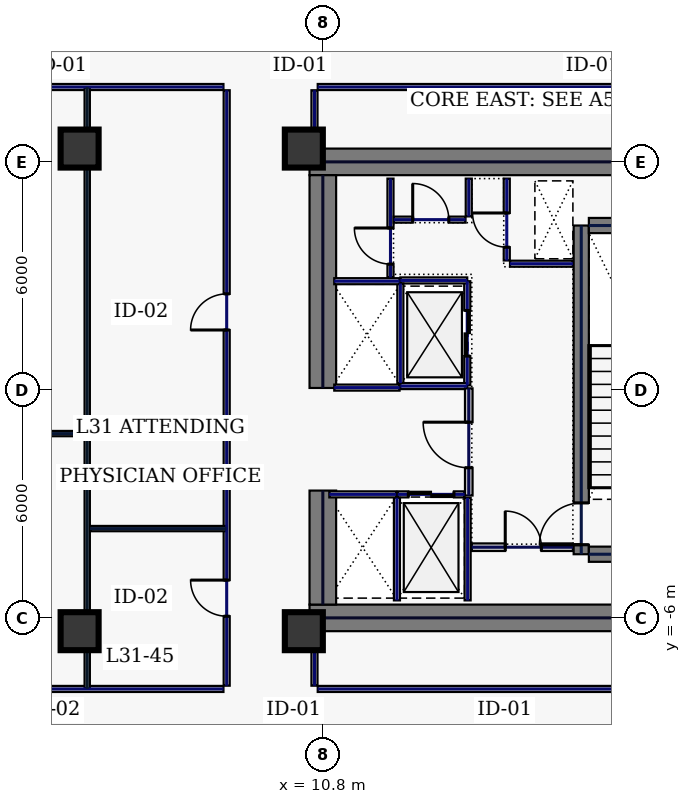
"""IFC4 building model, lengths in metres.
Left out: names, types, materials, properties, quantities, classifications, styles, units other than length and angle.
Written with IfcOpenShell. Run it as: python <this file> out.ifc"""

import sys

from ifc_helpers import new_model, si_unit, direction, frame, frame_2d, origin, origin_2d, place, context, subcontext, project, spatial, rectangle, hollow_rectangle, extrude, element, fill, save


model = new_model("IFC4")
c1 = context("Model", 3, precision=1e-05, world=origin(), true_north=direction((0.0, 1.0)))
c2 = subcontext(c1, "Body", "Model", "MODEL_VIEW")
j1 = project(units=[si_unit("LENGTHUNIT", "METRE"), si_unit("PLANEANGLEUNIT", "RADIAN")], contexts=[c1])
p1 = place(None, origin())
s1 = spatial("IfcSite", under=j1, at=p1, CompositionType="ELEMENT")
p2 = place(p1, origin())
s2 = spatial("IfcBuilding", under=s1, at=p2, CompositionType="ELEMENT")
p3 = place(p2, frame((0.0, 0.0, 137.4)))
s3 = spatial("IfcBuildingStorey", under=s2, at=p3, CompositionType="ELEMENT", Elevation=137.4)
for number, where, z_axis, x_axis in (
    (1, (10.45, 6.0, 0.0), (0.0, 0.0, 1.0), (1.0, 0.0, 0.0)),
    (2, (10.45, -6.0, 0.0), (0.0, 0.0, 1.0), (1.0, 0.0, 0.0)),
):
    element("IfcWall", number, at=place(p3, frame(where, z_axis=z_axis, x_axis=x_axis)), inside=s3, PredefinedType="SHEAR", context=c2, shape_type="SweptSolid", body=[
        extrude(rectangle(XDim=11.55, YDim=0.7, at=frame_2d((5.775, 0.0))), origin(), (0.0, 0.0, 1.0), 3.74),
    ])
p4 = place(p3, frame((10.8, -5.65, 0.0), z_axis=(0.0, 0.0, 1.0), x_axis=(0.0, 1.0, 0.0)))
e3 = element("IfcWall", 3, at=p4, inside=s3, PredefinedType="SHEAR", context=c2, shape_type="SweptSolid", body=[
    extrude(rectangle(XDim=3.0, YDim=0.7, at=frame_2d((1.5, 0.0))), origin(), (0.0, 0.0, 1.0), 3.74),
])
p5 = place(p3, frame((10.8, 0.05, 0.0), z_axis=(0.0, 0.0, 1.0), x_axis=(0.0, 1.0, 0.0)))
e4 = element("IfcWall", 4, at=p5, inside=s3, PredefinedType="SHEAR", context=c2, shape_type="SweptSolid", body=[
    extrude(rectangle(XDim=5.6, YDim=0.7, at=frame_2d((2.8, 0.0))), origin(), (0.0, 0.0, 1.0), 3.74),
])
p6 = place(p3, frame((17.6, -4.325, 0.0), z_axis=(0.0, 0.0, 1.0), x_axis=(0.0, 1.0, 0.0)))
e5 = element("IfcWall", 5, at=p6, inside=s3, PredefinedType="SHEAR", context=c2, shape_type="SweptSolid", body=[
    extrude(rectangle(XDim=8.65, YDim=0.4, at=frame_2d((4.325, 0.0))), origin(), (0.0, 0.0, 1.0), 3.74),
])
p7 = place(p6, frame((0.25, 0.0, 0.0)))
e6 = element("IfcOpeningElement", 6, at=p7, cuts=e5, PredefinedType="OPENING", context=c2, shape_type="SweptSolid", body=[
    extrude(rectangle(XDim=1.1, YDim=2.2, at=frame_2d((0.55, 1.1))), frame((0.0, 0.21, 0.0), z_axis=(0.0, -1.0, 0.0), x_axis=(1.0, 0.0, 0.0)), (0.0, 0.0, 1.0), 0.42),
])
for number, where, z_axis, x_axis in (
    (7, (17.8, -4.325, 0.0), (0.0, 0.0, 1.0), (1.0, 0.0, 0.0)),
    (8, (17.8, 4.325, 0.0), (0.0, 0.0, 1.0), (1.0, 0.0, 0.0)),
):
    element("IfcWall", number, at=place(p3, frame(where, z_axis=z_axis, x_axis=x_axis)), inside=s3, PredefinedType="SHEAR", context=c2, shape_type="SweptSolid", body=[
        extrude(rectangle(XDim=3.4, YDim=0.4, at=frame_2d((1.7, 0.0))), origin(), (0.0, 0.0, 1.0), 3.74),
    ])
for number, where, z_axis, x_axis in (
    (9, (10.3, -6.35, 0.0), (0.0, 0.0, 1.0), (1.0, 0.0, 0.0)),
    (10, (10.3, 6.35, 0.0), (0.0, 0.0, 1.0), (1.0, 0.0, 0.0)),
    (11, (4.4, -6.35, 0.0), (0.0, 0.0, 1.0), (1.0, 0.0, 0.0)),
    (12, (4.4, 6.35, 0.0), (0.0, 0.0, 1.0), (1.0, 0.0, 0.0)),
):
    element("IfcColumn", number, at=place(p3, frame(where, z_axis=z_axis, x_axis=x_axis)), inside=s3, PredefinedType="COLUMN", context=c2, shape_type="SweptSolid", body=[
        extrude(hollow_rectangle(XDim=1.0, YDim=1.0, WallThickness=0.045, at=origin_2d()), origin(), (0.0, 0.0, 1.0), 3.74),
    ])
p8 = place(p3, frame((14.6, 0.12, 0.0), z_axis=(0.0, 0.0, 1.0), x_axis=(0.0, 1.0, 0.0)))
e13 = element("IfcWall", 13, at=p8, inside=s3, PredefinedType="PARTITIONING", context=c2, shape_type="SweptSolid", body=[
    extrude(rectangle(XDim=2.74, YDim=0.16, at=frame_2d((1.37, 0.0))), origin(), (0.0, 0.0, 1.0), 3.74),
])
p9 = place(p8, frame((0.77, 0.0, 0.0)))
e14 = element("IfcOpeningElement", 14, at=p9, cuts=e13, PredefinedType="OPENING", context=c2, shape_type="SweptSolid", body=[
    extrude(rectangle(XDim=1.2, YDim=2.2, at=frame_2d((0.6, 1.1))), frame((0.0, 0.09, 0.0), z_axis=(0.0, -1.0, 0.0), x_axis=(1.0, 0.0, 0.0)), (0.0, 0.0, 1.0), 0.18),
])
for number, where, z_axis, x_axis in (
    (15, (12.84, 0.1, 0.0), (0.0, 0.0, 1.0), (1.0, 0.0, 0.0)),
    (16, (12.84, 2.88, 0.0), (0.0, 0.0, 1.0), (1.0, 0.0, 0.0)),
):
    element("IfcWall", number, at=place(p3, frame(where, z_axis=z_axis, x_axis=x_axis)), inside=s3, PredefinedType="PARTITIONING", context=c2, shape_type="SweptSolid", body=[
        extrude(rectangle(XDim=1.76, YDim=0.16, at=frame_2d((0.88, 0.0))), origin(), (0.0, 0.0, 1.0), 3.74),
    ])
p10 = place(p3, frame((12.84, 0.18, 0.0), z_axis=(0.0, 0.0, 1.0), x_axis=(0.0, 1.0, 0.0)))
e17 = element("IfcWall", 17, at=p10, inside=s3, PredefinedType="PARTITIONING", context=c2, shape_type="SweptSolid", body=[
    extrude(rectangle(XDim=2.62, YDim=0.16, at=frame_2d((1.31, 0.0))), origin(), (0.0, 0.0, 1.0), 3.74),
])
p11 = place(p3, frame((12.77, -2.75, 0.0), z_axis=(0.0, 0.0, 1.0), x_axis=(1.0, 0.0, 0.0)))
e18 = element("IfcWall", 18, at=p11, inside=s3, PredefinedType="PARTITIONING", context=c2, shape_type="SweptSolid", body=[
    extrude(rectangle(XDim=1.76, YDim=0.16, at=frame_2d((0.88, 0.0))), origin(), (0.0, 0.0, 1.0), 3.74),
])
p12 = place(p11, frame((0.28, 0.0, 0.0)))
e19 = element("IfcOpeningElement", 19, at=p12, cuts=e18, PredefinedType="OPENING", context=c2, shape_type="SweptSolid", body=[
    extrude(rectangle(XDim=1.2, YDim=2.2, at=frame_2d((0.6, 1.1))), frame((0.0, 0.09, 0.0), z_axis=(0.0, -1.0, 0.0), x_axis=(1.0, 0.0, 0.0)), (0.0, 0.0, 1.0), 0.18),
])
for number, where, z_axis, x_axis in (
    (20, (12.75, -5.54, 0.0), (0.0, 0.0, 1.0), (0.0, 1.0, 0.0)),
    (21, (14.61, -5.54, 0.0), (0.0, 0.0, 1.0), (0.0, 1.0, 0.0)),
):
    element("IfcWall", number, at=place(p3, frame(where, z_axis=z_axis, x_axis=x_axis)), inside=s3, PredefinedType="PARTITIONING", context=c2, shape_type="SweptSolid", body=[
        extrude(rectangle(XDim=2.7, YDim=0.16, at=frame_2d((1.35, 0.0))), origin(), (0.0, 0.0, 1.0), 3.74),
    ])
p13 = place(p3, frame((10.97, -2.75, 0.0), z_axis=(0.0, 0.0, 1.0), x_axis=(1.0, 0.0, 0.0)))
e22 = element("IfcWall", 22, at=p13, inside=s3, PredefinedType="PARTITIONING", context=c2, shape_type="SweptSolid", body=[
    extrude(rectangle(XDim=1.76, YDim=0.16, at=frame_2d((0.88, 0.0))), origin(), (0.0, 0.0, 1.0), 3.74),
])
for number, where, z_axis, x_axis in (
    (23, (11.1, 0.06, 0.0), (0.0, 0.0, 1.0), (1.0, 0.0, 0.0)),
    (24, (11.1, 2.86, 0.0), (0.0, 0.0, 1.0), (1.0, 0.0, 0.0)),
):
    element("IfcWall", number, at=place(p3, frame(where, z_axis=z_axis, x_axis=x_axis)), inside=s3, PredefinedType="PARTITIONING", context=c2, shape_type="SweptSolid", body=[
        extrude(rectangle(XDim=1.72, YDim=0.16, at=frame_2d((0.86, 0.0))), origin(), (0.0, 0.0, 1.0), 3.74),
    ])
p14 = place(p3, frame((15.64, 3.405, 0.0), z_axis=(0.0, 0.0, 1.0), x_axis=(0.0, 1.0, 0.0)))
e25 = element("IfcWall", 25, at=p14, inside=s3, PredefinedType="PARTITIONING", context=c2, shape_type="SweptSolid", body=[
    extrude(rectangle(XDim=2.155, YDim=0.16, at=frame_2d((1.078, 0.0))), origin(), (0.0, 0.0, 1.0), 3.74),
])
p15 = place(p14, frame((0.35, 0.0, 0.0)))
e26 = element("IfcOpeningElement", 26, at=p15, cuts=e25, PredefinedType="OPENING", context=c2, shape_type="SweptSolid", body=[
    extrude(rectangle(XDim=0.9, YDim=2.2, at=frame_2d((0.45, 1.1))), frame((0.0, 0.09, 0.0), z_axis=(0.0, -1.0, 0.0), x_axis=(1.0, 0.0, 0.0)), (0.0, 0.0, 1.0), 0.18),
])
p16 = place(p3, frame((15.725, 3.32, 0.0), z_axis=(0.0, 0.0, 1.0), x_axis=(1.0, 0.0, 0.0)))
e27 = element("IfcWall", 27, at=p16, inside=s3, PredefinedType="PARTITIONING", context=c2, shape_type="SweptSolid", body=[
    extrude(rectangle(XDim=1.655, YDim=0.16, at=frame_2d((0.827, 0.0))), origin(), (0.0, 0.0, 1.0), 3.74),
])
p17 = place(p3, frame((14.72, -4.14, 0.0), z_axis=(0.0, 0.0, 1.0), x_axis=(1.0, 0.0, 0.0)))
e28 = element("IfcWall", 28, at=p17, inside=s3, PredefinedType="SOLIDWALL", context=c2, shape_type="SweptSolid", body=[
    extrude(rectangle(XDim=2.66, YDim=0.2, at=frame_2d((1.33, 0.0))), origin(), (0.0, 0.0, 1.0), 3.74),
])
p18 = place(p17, frame((0.88, 0.0, 0.0)))
e29 = element("IfcOpeningElement", 29, at=p18, cuts=e28, PredefinedType="OPENING", context=c2, shape_type="SweptSolid", body=[
    extrude(rectangle(XDim=0.95, YDim=2.2, at=frame_2d((0.475, 1.1))), frame((0.0, 0.11, 0.0), z_axis=(0.0, -1.0, 0.0), x_axis=(1.0, 0.0, 0.0)), (0.0, 0.0, 1.0), 0.22),
])
p19 = place(p3, frame((12.58, 2.96, 0.0), z_axis=(0.0, 0.0, 1.0), x_axis=(0.0, 1.0, 0.0)))
e30 = element("IfcWall", 30, at=p19, inside=s3, PredefinedType="PARTITIONING", context=c2, shape_type="SweptSolid", body=[
    extrude(rectangle(XDim=2.6, YDim=0.16, at=frame_2d((1.3, 0.0))), origin(), (0.0, 0.0, 1.0), 3.74),
])
p20 = place(p19, frame((0.35, 0.0, 0.0)))
e31 = element("IfcOpeningElement", 31, at=p20, cuts=e30, PredefinedType="OPENING", context=c2, shape_type="SweptSolid", body=[
    extrude(rectangle(XDim=0.95, YDim=2.2, at=frame_2d((0.475, 1.1))), frame((0.0, 0.09, 0.0), z_axis=(0.0, -1.0, 0.0), x_axis=(1.0, 0.0, 0.0)), (0.0, 0.0, 1.0), 0.18),
])
p21 = place(p3, frame((12.665, 4.48, 0.0), z_axis=(0.0, 0.0, 1.0), x_axis=(1.0, 0.0, 0.0)))
e32 = element("IfcWall", 32, at=p21, inside=s3, PredefinedType="PARTITIONING", context=c2, shape_type="SweptSolid", body=[
    extrude(rectangle(XDim=1.89, YDim=0.16, at=frame_2d((0.945, 0.0))), origin(), (0.0, 0.0, 1.0), 3.74),
])
p22 = place(p21, frame((0.5, 0.0, 0.0)))
e33 = element("IfcOpeningElement", 33, at=p22, cuts=e32, PredefinedType="OPENING", context=c2, shape_type="SweptSolid", body=[
    extrude(rectangle(XDim=0.95, YDim=2.2, at=frame_2d((0.475, 1.1))), frame((0.0, 0.09, 0.0), z_axis=(0.0, -1.0, 0.0), x_axis=(1.0, 0.0, 0.0)), (0.0, 0.0, 1.0), 0.18),
])
p23 = place(p3, frame((14.64, 4.565, 0.0), z_axis=(0.0, 0.0, 1.0), x_axis=(0.0, 1.0, 0.0)))
e34 = element("IfcWall", 34, at=p23, inside=s3, PredefinedType="PARTITIONING", context=c2, shape_type="SweptSolid", body=[
    extrude(rectangle(XDim=0.995, YDim=0.16, at=frame_2d((0.498, 0.0))), origin(), (0.0, 0.0, 1.0), 3.74),
])
p24 = place(p3, frame((14.64, -2.78, 0.0), z_axis=(0.0, 0.0, 1.0), x_axis=(0.0, 1.0, 0.0)))
e35 = element("IfcWall", 35, at=p24, inside=s3, PredefinedType="SOLIDWALL", context=c2, shape_type="SweptSolid", body=[
    extrude(rectangle(XDim=2.82, YDim=0.2, at=frame_2d((1.41, 0.0))), origin(), (0.0, 0.0, 1.0), 3.74),
])
p25 = place(p24, frame((0.73, 0.0, 0.0)))
e36 = element("IfcOpeningElement", 36, at=p25, cuts=e35, PredefinedType="OPENING", context=c2, shape_type="SweptSolid", body=[
    extrude(rectangle(XDim=1.2, YDim=2.2, at=frame_2d((0.6, 1.1))), frame((0.0, 0.11, 0.0), z_axis=(0.0, -1.0, 0.0), x_axis=(1.0, 0.0, 0.0)), (0.0, 0.0, 1.0), 0.22),
])
p26 = place(p3, frame((25.235, 7.97, 0.0), z_axis=(0.0, 0.0, 1.0), x_axis=(-1.0, 0.0, 0.0)))
e37 = element("IfcWall", 37, at=p26, inside=s3, PredefinedType="PARTITIONING", context=c2, shape_type="SweptSolid", body=[
    extrude(rectangle(XDim=14.57, YDim=0.16, at=frame_2d((7.285, 0.0))), origin(), (0.0, 0.0, 1.0), 3.74),
])
p27 = place(p3, frame((10.58, 7.885, 0.0), z_axis=(0.0, 0.0, 1.0), x_axis=(0.0, -1.0, 0.0)))
e38 = element("IfcWall", 38, at=p27, inside=s3, PredefinedType="PARTITIONING", context=c2, shape_type="SweptSolid", body=[
    extrude(rectangle(XDim=1.465, YDim=0.16, at=frame_2d((0.732, 0.0))), origin(), (0.0, 0.0, 1.0), 3.74),
])
p28 = place(p3, frame((10.58, -6.42, 0.0), z_axis=(0.0, 0.0, 1.0), x_axis=(0.0, -1.0, 0.0)))
e39 = element("IfcWall", 39, at=p28, inside=s3, PredefinedType="PARTITIONING", context=c2, shape_type="SweptSolid", body=[
    extrude(rectangle(XDim=1.365, YDim=0.16, at=frame_2d((0.683, 0.0))), origin(), (0.0, 0.0, 1.0), 3.74),
])
p29 = place(p3, frame((10.665, -7.87, 0.0), z_axis=(0.0, 0.0, 1.0), x_axis=(1.0, 0.0, 0.0)))
e40 = element("IfcWall", 40, at=p29, inside=s3, PredefinedType="PARTITIONING", context=c2, shape_type="SweptSolid", body=[
    extrude(rectangle(XDim=14.57, YDim=0.16, at=frame_2d((7.285, 0.0))), origin(), (0.0, 0.0, 1.0), 3.74),
])
p30 = place(p3, frame((8.27, -7.785, 0.0), z_axis=(0.0, 0.0, 1.0), x_axis=(0.0, 1.0, 0.0)))
e41 = element("IfcWall", 41, at=p30, inside=s3, PredefinedType="PARTITIONING", context=c2, shape_type="SweptSolid", body=[
    extrude(rectangle(XDim=15.67, YDim=0.16, at=frame_2d((7.835, 0.0))), origin(), (0.0, 0.0, 1.0), 3.74),
])
p31 = place(p30, frame((1.829, 0.0, 0.0)))
e42 = element("IfcOpeningElement", 42, at=p31, cuts=e41, PredefinedType="OPENING", context=c2, shape_type="SweptSolid", body=[
    extrude(rectangle(XDim=0.95, YDim=2.2, at=frame_2d((0.475, 1.1))), frame((0.0, 0.09, 0.0), z_axis=(0.0, -1.0, 0.0), x_axis=(1.0, 0.0, 0.0)), (0.0, 0.0, 1.0), 0.18),
])
p32 = place(p30, frame((9.361, 0.0, 0.0)))
e43 = element("IfcOpeningElement", 43, at=p32, cuts=e41, PredefinedType="OPENING", context=c2, shape_type="SweptSolid", body=[
    extrude(rectangle(XDim=0.95, YDim=2.2, at=frame_2d((0.475, 1.1))), frame((0.0, 0.09, 0.0), z_axis=(0.0, -1.0, 0.0), x_axis=(1.0, 0.0, 0.0)), (0.0, 0.0, 1.0), 0.18),
])
p33 = place(p3, frame((8.185, 7.97, 0.0), z_axis=(0.0, 0.0, 1.0), x_axis=(-1.0, 0.0, 0.0)))
e44 = element("IfcWall", 44, at=p33, inside=s3, PredefinedType="PARTITIONING", context=c2, shape_type="SweptSolid", body=[
    extrude(rectangle(XDim=16.37, YDim=0.16, at=frame_2d((8.185, 0.0))), origin(), (0.0, 0.0, 1.0), 3.74),
])
p34 = place(p33, frame((7.795, 0.0, 0.0)))
e45 = element("IfcOpeningElement", 45, at=p34, cuts=e44, PredefinedType="OPENING", context=c2, shape_type="SweptSolid", body=[
    extrude(rectangle(XDim=0.95, YDim=2.2, at=frame_2d((0.475, 1.1))), frame((0.0, 0.09, 0.0), z_axis=(0.0, -1.0, 0.0), x_axis=(1.0, 0.0, 0.0)), (0.0, 0.0, 1.0), 0.18),
])
p35 = place(p3, frame((-8.185, -7.87, 0.0), z_axis=(0.0, 0.0, 1.0), x_axis=(1.0, 0.0, 0.0)))
e46 = element("IfcWall", 46, at=p35, inside=s3, PredefinedType="PARTITIONING", context=c2, shape_type="SweptSolid", body=[
    extrude(rectangle(XDim=16.37, YDim=0.16, at=frame_2d((8.185, 0.0))), origin(), (0.0, 0.0, 1.0), 3.74),
])
p36 = place(p35, frame((1.554, 0.0, 0.0)))
e47 = element("IfcOpeningElement", 47, at=p36, cuts=e46, PredefinedType="OPENING", context=c2, shape_type="SweptSolid", body=[
    extrude(rectangle(XDim=0.95, YDim=2.2, at=frame_2d((0.475, 1.1))), frame((0.0, 0.09, 0.0), z_axis=(0.0, -1.0, 0.0), x_axis=(1.0, 0.0, 0.0)), (0.0, 0.0, 1.0), 0.18),
])
p37 = place(p35, frame((7.795, 0.0, 0.0)))
e48 = element("IfcOpeningElement", 48, at=p37, cuts=e46, PredefinedType="OPENING", context=c2, shape_type="SweptSolid", body=[
    extrude(rectangle(XDim=0.95, YDim=2.2, at=frame_2d((0.475, 1.1))), frame((0.0, 0.09, 0.0), z_axis=(0.0, -1.0, 0.0), x_axis=(1.0, 0.0, 0.0)), (0.0, 0.0, 1.0), 0.18),
])
p38 = place(p3, frame((4.6, -7.865, 0.0), z_axis=(0.0, 0.0, 1.0), x_axis=(0.0, 1.0, 0.0)))
e49 = element("IfcWall", 49, at=p38, inside=s3, PredefinedType="PARTITIONING", context=c2, shape_type="SweptSolid", body=[
    extrude(rectangle(XDim=15.83, YDim=0.14, at=frame_2d((7.915, 0.0))), origin(), (0.0, 0.0, 1.0), 2.935),
])
p39 = place(p3, frame((-4.525, -1.15, 0.0), z_axis=(0.0, 0.0, 1.0), x_axis=(1.0, 0.0, 0.0)))
e50 = element("IfcWall", 50, at=p39, inside=s3, PredefinedType="PARTITIONING", context=c2, shape_type="SweptSolid", body=[
    extrude(rectangle(XDim=9.05, YDim=0.14, at=frame_2d((4.525, 0.0))), origin(), (0.0, 0.0, 1.0), 3.74),
])
p40 = place(p3, frame((4.675, -3.65, 0.0), z_axis=(0.0, 0.0, 1.0), x_axis=(1.0, 0.0, 0.0)))
e51 = element("IfcWall", 51, at=p40, inside=s3, PredefinedType="PARTITIONING", context=c2, shape_type="SweptSolid", body=[
    extrude(rectangle(XDim=3.59, YDim=0.14, at=frame_2d((1.795, 0.0))), origin(), (0.0, 0.0, 1.0), 3.74),
])
p41 = place(p7, origin())
e52 = element("IfcDoor", 52, at=p41, inside=s3, OperationType="SINGLE_SWING_LEFT", PredefinedType="DOOR", context=c2, shape_type="SweptSolid", body=[
    extrude(rectangle(XDim=1.1, YDim=2.2, at=frame_2d((0.55, 1.1))), frame((0.0, 0.025, 0.0), z_axis=(0.0, -1.0, 0.0), x_axis=(1.0, 0.0, 0.0)), (0.0, 0.0, 1.0), 0.05),
])
fill(e6, e52)
p42 = place(p9, origin())
e53 = element("IfcDoor", 53, at=p42, inside=s3, OperationType="SLIDING_TO_LEFT", PredefinedType="DOOR", context=c2, shape_type="SweptSolid", body=[
    extrude(rectangle(XDim=1.2, YDim=2.2, at=frame_2d((0.6, 1.1))), frame((0.0, 0.025, 0.0), z_axis=(0.0, -1.0, 0.0), x_axis=(1.0, 0.0, 0.0)), (0.0, 0.0, 1.0), 0.05),
])
fill(e14, e53)
p43 = place(p12, origin())
e54 = element("IfcDoor", 54, at=p43, inside=s3, OperationType="SLIDING_TO_LEFT", PredefinedType="DOOR", context=c2, shape_type="SweptSolid", body=[
    extrude(rectangle(XDim=1.2, YDim=2.2, at=frame_2d((0.6, 1.1))), frame((0.0, 0.025, 0.0), z_axis=(0.0, -1.0, 0.0), x_axis=(1.0, 0.0, 0.0)), (0.0, 0.0, 1.0), 0.05),
])
fill(e19, e54)
p44 = place(p15, origin())
e55 = element("IfcDoor", 55, at=p44, inside=s3, OperationType="SINGLE_SWING_RIGHT", PredefinedType="DOOR", context=c2, shape_type="SweptSolid", body=[
    extrude(rectangle(XDim=0.9, YDim=2.2, at=frame_2d((0.45, 1.1))), frame((0.0, 0.025, 0.0), z_axis=(0.0, -1.0, 0.0), x_axis=(1.0, 0.0, 0.0)), (0.0, 0.0, 1.0), 0.05),
])
fill(e26, e55)
p45 = place(p18, origin())
e56 = element("IfcDoor", 56, at=p45, inside=s3, OperationType="SINGLE_SWING_LEFT", PredefinedType="DOOR", context=c2, shape_type="SweptSolid", body=[
    extrude(rectangle(XDim=0.95, YDim=2.2, at=frame_2d((0.475, 1.1))), frame((0.0, 0.025, 0.0), z_axis=(0.0, -1.0, 0.0), x_axis=(1.0, 0.0, 0.0)), (0.0, 0.0, 1.0), 0.05),
])
fill(e29, e56)
p46 = place(p20, origin())
e57 = element("IfcDoor", 57, at=p46, inside=s3, OperationType="SINGLE_SWING_RIGHT", PredefinedType="DOOR", context=c2, shape_type="SweptSolid", body=[
    extrude(rectangle(XDim=0.95, YDim=2.2, at=frame_2d((0.475, 1.1))), frame((0.0, 0.025, 0.0), z_axis=(0.0, -1.0, 0.0), x_axis=(1.0, 0.0, 0.0)), (0.0, 0.0, 1.0), 0.05),
])
fill(e31, e57)
p47 = place(p22, origin())
e58 = element("IfcDoor", 58, at=p47, inside=s3, OperationType="SINGLE_SWING_LEFT", PredefinedType="DOOR", context=c2, shape_type="SweptSolid", body=[
    extrude(rectangle(XDim=0.95, YDim=2.2, at=frame_2d((0.475, 1.1))), frame((0.0, 0.025, 0.0), z_axis=(0.0, -1.0, 0.0), x_axis=(1.0, 0.0, 0.0)), (0.0, 0.0, 1.0), 0.05),
])
fill(e33, e58)
p48 = place(p25, origin())
e59 = element("IfcDoor", 59, at=p48, inside=s3, OperationType="SINGLE_SWING_RIGHT", PredefinedType="DOOR", context=c2, shape_type="SweptSolid", body=[
    extrude(rectangle(XDim=1.2, YDim=2.2, at=frame_2d((0.6, 1.1))), frame((0.0, 0.025, 0.0), z_axis=(0.0, -1.0, 0.0), x_axis=(1.0, 0.0, 0.0)), (0.0, 0.0, 1.0), 0.05),
])
fill(e36, e59)
p49 = place(p31, origin())
e60 = element("IfcDoor", 60, at=p49, inside=s3, OperationType="SINGLE_SWING_RIGHT", PredefinedType="DOOR", context=c2, shape_type="SweptSolid", body=[
    extrude(rectangle(XDim=0.95, YDim=2.2, at=frame_2d((0.475, 1.1))), frame((0.0, 0.025, 0.0), z_axis=(0.0, -1.0, 0.0), x_axis=(1.0, 0.0, 0.0)), (0.0, 0.0, 1.0), 0.05),
])
fill(e42, e60)
p50 = place(p32, origin())
e61 = element("IfcDoor", 61, at=p50, inside=s3, OperationType="SINGLE_SWING_LEFT", PredefinedType="DOOR", context=c2, shape_type="SweptSolid", body=[
    extrude(rectangle(XDim=0.95, YDim=2.2, at=frame_2d((0.475, 1.1))), frame((0.0, 0.025, 0.0), z_axis=(0.0, -1.0, 0.0), x_axis=(1.0, 0.0, 0.0)), (0.0, 0.0, 1.0), 0.05),
])
fill(e43, e61)
save(model, sys.argv[1])
